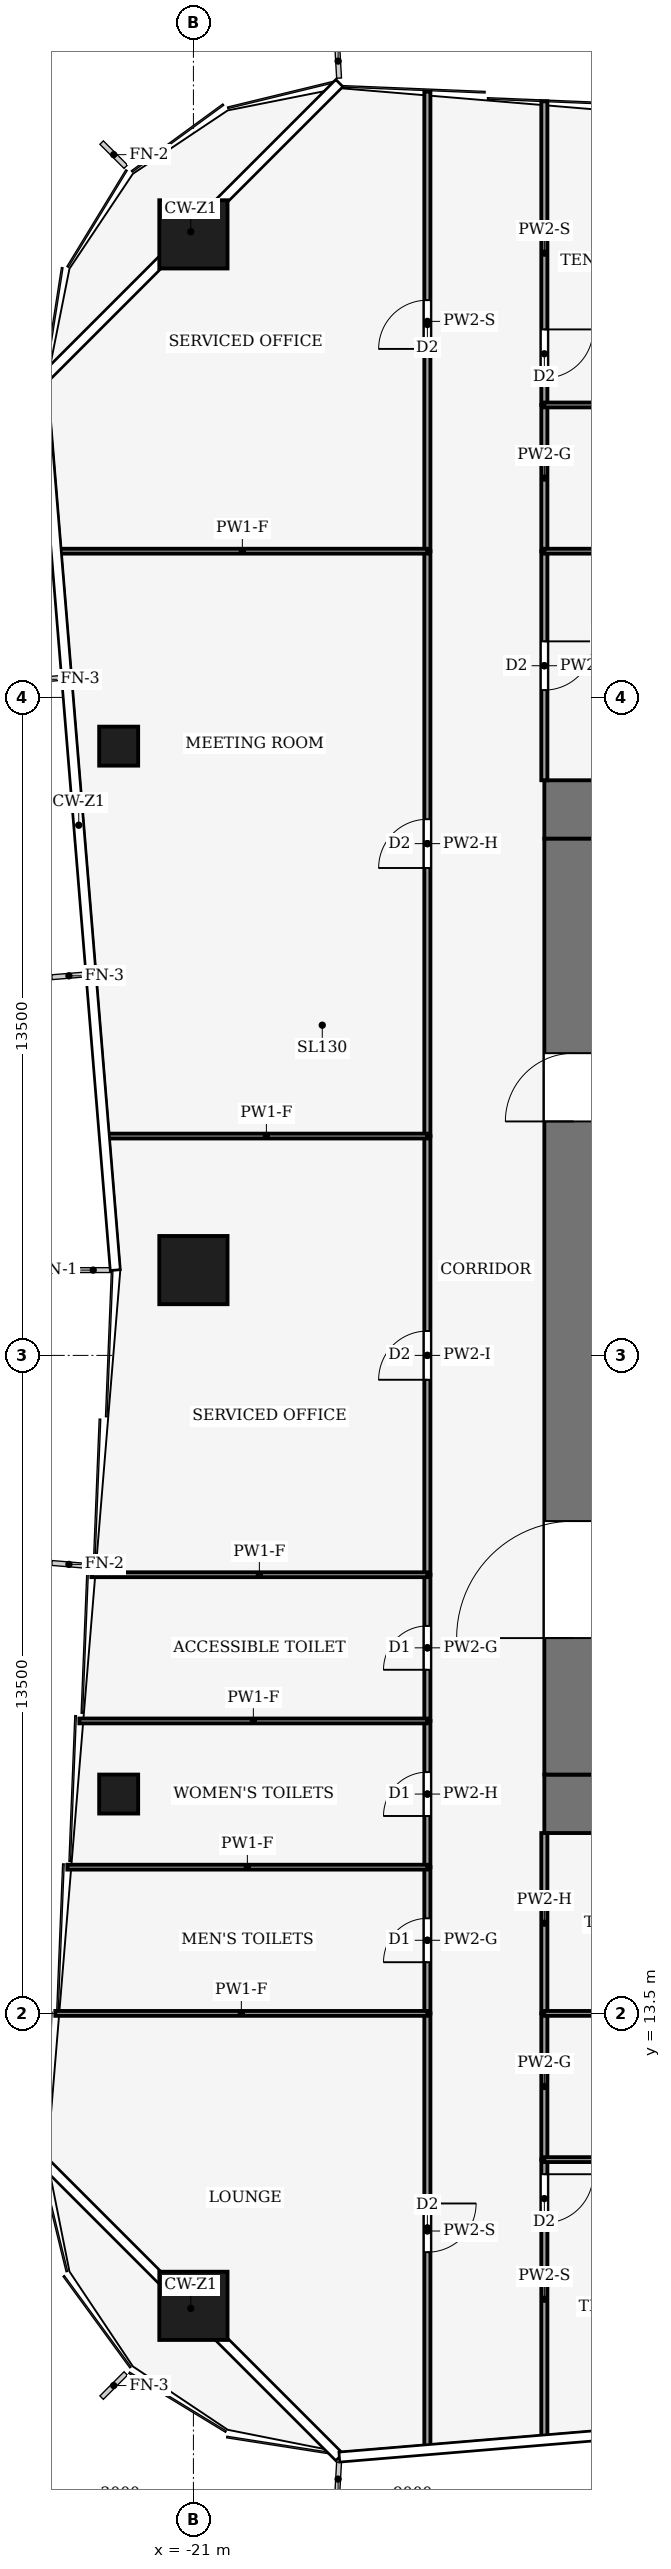
"""IFC4 building model, lengths in metres.
Left out: names, types, materials, properties, quantities, classifications, styles, units other than length and angle.
Written with IfcOpenShell. Run it as: python <this file> out.ifc"""

import sys

from ifc_helpers import new_model, si_unit, direction, frame, frame_2d, origin, origin_2d, place, context, subcontext, project, spatial, rectangle, hollow_rectangle, extrude, element, fill, save


model = new_model("IFC4")
c1 = context("Model", 3, precision=1e-05, world=origin(), true_north=direction((0.0, 1.0)))
c2 = subcontext(c1, "Body", "Model", "MODEL_VIEW")
j1 = project(units=[si_unit("LENGTHUNIT", "METRE"), si_unit("PLANEANGLEUNIT", "RADIAN")], contexts=[c1])
p1 = place(None, origin())
s1 = spatial("IfcSite", under=j1, at=p1, CompositionType="ELEMENT")
p2 = place(p1, origin())
s2 = spatial("IfcBuilding", under=s1, at=p2, CompositionType="ELEMENT")
p3 = place(p2, frame((0.0, 0.0, 94.0)))
s3 = spatial("IfcBuildingStorey", under=s2, at=p3, CompositionType="ELEMENT", Elevation=94.0)
for number, where, z_axis, x_axis in (
    (1, (-13.8, 17.8, -0.13), (0.0, 0.0, 1.0), (1.0, 0.0, 0.0)),
    (2, (-13.8, 38.2, -0.13), (0.0, 0.0, 1.0), (1.0, 0.0, 0.0)),
):
    element("IfcWall", number, at=place(p3, frame(where, z_axis=z_axis, x_axis=x_axis)), inside=s3, PredefinedType="SHEAR", context=c2, shape_type="SweptSolid", body=[
        extrude(rectangle(XDim=27.6, YDim=1.2, at=frame_2d((13.8, 0.0))), origin(), (0.0, 0.0, 1.0), 4.0),
    ])
p4 = place(p3, frame((-13.2, 18.4, -0.13), z_axis=(0.0, 0.0, 1.0), x_axis=(0.0, 1.0, 0.0)))
e3 = element("IfcWall", 3, at=p4, inside=s3, PredefinedType="SHEAR", context=c2, shape_type="SweptSolid", body=[
    extrude(rectangle(XDim=19.2, YDim=1.2, at=frame_2d((9.6, 0.0))), origin(), (0.0, 0.0, 1.0), 4.0),
])
p5 = place(p4, frame((2.8, 0.0, 0.13)))
e4 = element("IfcOpeningElement", 4, at=p5, cuts=e3, PredefinedType="OPENING", context=c2, shape_type="SweptSolid", body=[
    extrude(rectangle(XDim=2.4, YDim=2.4, at=frame_2d((1.2, 1.2))), frame((0.0, 0.61, 0.0), z_axis=(0.0, -1.0, 0.0), x_axis=(1.0, 0.0, 0.0)), (0.0, 0.0, 1.0), 1.22),
])
p6 = place(p4, frame((13.4, 0.0, 0.13)))
e5 = element("IfcOpeningElement", 5, at=p6, cuts=e3, PredefinedType="OPENING", context=c2, shape_type="SweptSolid", body=[
    extrude(rectangle(XDim=1.4, YDim=2.2, at=frame_2d((0.7, 1.1))), frame((0.0, 0.61, 0.0), z_axis=(0.0, -1.0, 0.0), x_axis=(1.0, 0.0, 0.0)), (0.0, 0.0, 1.0), 1.22),
])
for number, where, z_axis, x_axis in (
    (6, (-21.0, 50.0, 0.0), (0.0, 0.0, 1.0), (1.0, 0.0, 0.0)),
    (7, (-21.0, 7.5, 0.0), (0.0, 0.0, 1.0), (1.0, 0.0, 0.0)),
    (8, (-21.0, 28.75, 0.0), (0.0, 0.0, 1.0), (1.0, 0.0, 0.0)),
):
    element("IfcColumn", number, at=place(p3, frame(where, z_axis=z_axis, x_axis=x_axis)), inside=s3, PredefinedType="COLUMN", context=c2, shape_type="SweptSolid", body=[
        extrude(hollow_rectangle(XDim=1.4, YDim=1.4, WallThickness=0.08, at=origin_2d()), origin(), (0.0, 0.0, 1.0), 4.0),
    ])
for number, where, z_axis, x_axis in (
    (9, (-22.534, 18.0, 0.0), (0.0, 0.0, 1.0), (1.0, 0.0, 0.0)),
    (10, (-22.534, 39.5, 0.0), (0.0, 0.0, 1.0), (1.0, 0.0, 0.0)),
):
    element("IfcColumn", number, at=place(p3, frame(where, z_axis=z_axis, x_axis=x_axis)), inside=s3, PredefinedType="COLUMN", context=c2, shape_type="SweptSolid", body=[
        extrude(hollow_rectangle(XDim=0.8, YDim=0.8, WallThickness=0.04, at=origin_2d()), origin(), (0.0, 0.0, 1.0), 4.0),
    ])
p7 = place(p3, frame((-16.2, 13.5, 0.0), z_axis=(0.0, 0.0, 1.0), x_axis=(0.0, -1.0, 0.0)))
e11 = element("IfcWall", 11, at=p7, inside=s3, PredefinedType="PARTITIONING", context=c2, shape_type="SweptSolid", body=[
    extrude(rectangle(XDim=8.93, YDim=0.125, at=frame_2d((4.465, 0.0))), origin(), (0.0, 0.0, 1.0), 3.04),
])
p8 = place(p7, frame((3.9, 0.0, 0.0)))
e12 = element("IfcOpeningElement", 12, at=p8, cuts=e11, PredefinedType="OPENING", context=c2, shape_type="SweptSolid", body=[
    extrude(rectangle(XDim=1.0, YDim=2.1, at=frame_2d((0.5, 1.05))), frame((0.0, 0.073, 0.0), z_axis=(0.0, -1.0, 0.0), x_axis=(1.0, 0.0, 0.0)), (0.0, 0.0, 1.0), 0.145),
])
p9 = place(p3, frame((-16.2, 13.5, 0.0), z_axis=(0.0, 0.0, 1.0), x_axis=(0.0, 1.0, 0.0)))
e13 = element("IfcWall", 13, at=p9, inside=s3, PredefinedType="PARTITIONING", context=c2, shape_type="SweptSolid", body=[
    extrude(rectangle(XDim=3.0, YDim=0.125, at=frame_2d((1.5, 0.0))), origin(), (0.0, 0.0, 1.0), 3.87),
])
p10 = place(p9, frame((1.05, 0.0, 0.0)))
e14 = element("IfcOpeningElement", 14, at=p10, cuts=e13, PredefinedType="OPENING", context=c2, shape_type="SweptSolid", body=[
    extrude(rectangle(XDim=0.9, YDim=2.1, at=frame_2d((0.45, 1.05))), frame((0.0, 0.073, 0.0), z_axis=(0.0, -1.0, 0.0), x_axis=(1.0, 0.0, 0.0)), (0.0, 0.0, 1.0), 0.145),
])
p11 = place(p3, frame((-16.2, 16.5, 0.0), z_axis=(0.0, 0.0, 1.0), x_axis=(0.0, 1.0, 0.0)))
e15 = element("IfcWall", 15, at=p11, inside=s3, PredefinedType="PARTITIONING", context=c2, shape_type="SweptSolid", body=[
    extrude(rectangle(XDim=3.0, YDim=0.125, at=frame_2d((1.5, 0.0))), origin(), (0.0, 0.0, 1.0), 3.14),
])
p12 = place(p11, frame((1.05, 0.0, 0.0)))
e16 = element("IfcOpeningElement", 16, at=p12, cuts=e15, PredefinedType="OPENING", context=c2, shape_type="SweptSolid", body=[
    extrude(rectangle(XDim=0.9, YDim=2.1, at=frame_2d((0.45, 1.05))), frame((0.0, 0.073, 0.0), z_axis=(0.0, -1.0, 0.0), x_axis=(1.0, 0.0, 0.0)), (0.0, 0.0, 1.0), 0.145),
])
p13 = place(p3, frame((-16.2, 19.5, 0.0), z_axis=(0.0, 0.0, 1.0), x_axis=(0.0, 1.0, 0.0)))
e17 = element("IfcWall", 17, at=p13, inside=s3, PredefinedType="PARTITIONING", context=c2, shape_type="SweptSolid", body=[
    extrude(rectangle(XDim=3.0, YDim=0.125, at=frame_2d((1.5, 0.0))), origin(), (0.0, 0.0, 1.0), 3.87),
])
p14 = place(p13, frame((1.05, 0.0, 0.0)))
e18 = element("IfcOpeningElement", 18, at=p14, cuts=e17, PredefinedType="OPENING", context=c2, shape_type="SweptSolid", body=[
    extrude(rectangle(XDim=0.9, YDim=2.1, at=frame_2d((0.45, 1.05))), frame((0.0, 0.073, 0.0), z_axis=(0.0, -1.0, 0.0), x_axis=(1.0, 0.0, 0.0)), (0.0, 0.0, 1.0), 0.145),
])
p15 = place(p3, frame((-16.2, 22.5, 0.0), z_axis=(0.0, 0.0, 1.0), x_axis=(0.0, 1.0, 0.0)))
e19 = element("IfcWall", 19, at=p15, inside=s3, PredefinedType="PARTITIONING", context=c2, shape_type="SweptSolid", body=[
    extrude(rectangle(XDim=9.0, YDim=0.125, at=frame_2d((4.5, 0.0))), origin(), (0.0, 0.0, 1.0), 3.48),
])
p16 = place(p15, frame((4.0, 0.0, 0.0)))
e20 = element("IfcOpeningElement", 20, at=p16, cuts=e19, PredefinedType="OPENING", context=c2, shape_type="SweptSolid", body=[
    extrude(rectangle(XDim=1.0, YDim=2.1, at=frame_2d((0.5, 1.05))), frame((0.0, 0.073, 0.0), z_axis=(0.0, -1.0, 0.0), x_axis=(1.0, 0.0, 0.0)), (0.0, 0.0, 1.0), 0.145),
])
p17 = place(p3, frame((-16.2, 31.5, 0.0), z_axis=(0.0, 0.0, 1.0), x_axis=(0.0, 1.0, 0.0)))
e21 = element("IfcWall", 21, at=p17, inside=s3, PredefinedType="PARTITIONING", context=c2, shape_type="SweptSolid", body=[
    extrude(rectangle(XDim=12.0, YDim=0.125, at=frame_2d((6.0, 0.0))), origin(), (0.0, 0.0, 1.0), 3.14),
])
p18 = place(p17, frame((5.5, 0.0, 0.0)))
e22 = element("IfcOpeningElement", 22, at=p18, cuts=e21, PredefinedType="OPENING", context=c2, shape_type="SweptSolid", body=[
    extrude(rectangle(XDim=1.0, YDim=2.1, at=frame_2d((0.5, 1.05))), frame((0.0, 0.073, 0.0), z_axis=(0.0, -1.0, 0.0), x_axis=(1.0, 0.0, 0.0)), (0.0, 0.0, 1.0), 0.145),
])
p19 = place(p3, frame((-16.2, 43.5, 0.0), z_axis=(0.0, 0.0, 1.0), x_axis=(0.0, 1.0, 0.0)))
e23 = element("IfcWall", 23, at=p19, inside=s3, PredefinedType="PARTITIONING", context=c2, shape_type="SweptSolid", body=[
    extrude(rectangle(XDim=9.43, YDim=0.125, at=frame_2d((4.715, 0.0))), origin(), (0.0, 0.0, 1.0), 3.04),
])
p20 = place(p19, frame((4.15, 0.0, 0.0)))
e24 = element("IfcOpeningElement", 24, at=p20, cuts=e23, PredefinedType="OPENING", context=c2, shape_type="SweptSolid", body=[
    extrude(rectangle(XDim=1.0, YDim=2.1, at=frame_2d((0.5, 1.05))), frame((0.0, 0.073, 0.0), z_axis=(0.0, -1.0, 0.0), x_axis=(1.0, 0.0, 0.0)), (0.0, 0.0, 1.0), 0.145),
])
p21 = place(p3, frame((-13.8, 10.5, 0.0), z_axis=(0.0, 0.0, 1.0), x_axis=(0.0, -1.0, 0.0)))
e25 = element("IfcWall", 25, at=p21, inside=s3, PredefinedType="PARTITIONING", context=c2, shape_type="SweptSolid", body=[
    extrude(rectangle(XDim=5.73, YDim=0.125, at=frame_2d((2.865, 0.0))), origin(), (0.0, 0.0, 1.0), 3.04),
])
p22 = place(p21, frame((0.3, 0.0, 0.0)))
e26 = element("IfcOpeningElement", 26, at=p22, cuts=e25, PredefinedType="OPENING", context=c2, shape_type="SweptSolid", body=[
    extrude(rectangle(XDim=1.0, YDim=2.1, at=frame_2d((0.5, 1.05))), frame((0.0, 0.073, 0.0), z_axis=(0.0, -1.0, 0.0), x_axis=(1.0, 0.0, 0.0)), (0.0, 0.0, 1.0), 0.145),
])
p23 = place(p3, frame((-13.8, 10.5, 0.0), z_axis=(0.0, 0.0, 1.0), x_axis=(0.0, 1.0, 0.0)))
e27 = element("IfcWall", 27, at=p23, inside=s3, PredefinedType="PARTITIONING", context=c2, shape_type="SweptSolid", body=[
    extrude(rectangle(XDim=3.0, YDim=0.125, at=frame_2d((1.5, 0.0))), origin(), (0.0, 0.0, 1.0), 3.87),
])
p24 = place(p3, frame((-13.8, 13.5, 0.0), z_axis=(0.0, 0.0, 1.0), x_axis=(0.0, 1.0, 0.0)))
e28 = element("IfcWall", 28, at=p24, inside=s3, PredefinedType="PARTITIONING", context=c2, shape_type="SweptSolid", body=[
    extrude(rectangle(XDim=3.7, YDim=0.125, at=frame_2d((1.85, 0.0))), origin(), (0.0, 0.0, 1.0), 3.14),
])
p25 = place(p3, frame((-13.8, 43.5, 0.0), z_axis=(0.0, 0.0, 1.0), x_axis=(0.0, -1.0, 0.0)))
e29 = element("IfcWall", 29, at=p25, inside=s3, PredefinedType="PARTITIONING", context=c2, shape_type="SweptSolid", body=[
    extrude(rectangle(XDim=4.7, YDim=0.125, at=frame_2d((2.35, 0.0))), origin(), (0.0, 0.0, 1.0), 3.14),
])
p26 = place(p25, frame((1.85, 0.0, 0.0)))
e30 = element("IfcOpeningElement", 30, at=p26, cuts=e29, PredefinedType="OPENING", context=c2, shape_type="SweptSolid", body=[
    extrude(rectangle(XDim=1.0, YDim=2.1, at=frame_2d((0.5, 1.05))), frame((0.0, 0.073, 0.0), z_axis=(0.0, -1.0, 0.0), x_axis=(1.0, 0.0, 0.0)), (0.0, 0.0, 1.0), 0.145),
])
p27 = place(p3, frame((-13.8, 43.5, 0.0), z_axis=(0.0, 0.0, 1.0), x_axis=(0.0, 1.0, 0.0)))
e31 = element("IfcWall", 31, at=p27, inside=s3, PredefinedType="PARTITIONING", context=c2, shape_type="SweptSolid", body=[
    extrude(rectangle(XDim=3.0, YDim=0.125, at=frame_2d((1.5, 0.0))), origin(), (0.0, 0.0, 1.0), 3.87),
])
p28 = place(p3, frame((-13.8, 52.73, 0.0), z_axis=(0.0, 0.0, 1.0), x_axis=(0.0, -1.0, 0.0)))
e32 = element("IfcWall", 32, at=p28, inside=s3, PredefinedType="PARTITIONING", context=c2, shape_type="SweptSolid", body=[
    extrude(rectangle(XDim=6.23, YDim=0.125, at=frame_2d((3.115, 0.0))), origin(), (0.0, 0.0, 1.0), 3.04),
])
p29 = place(p28, frame((4.68, 0.0, 0.0)))
e33 = element("IfcOpeningElement", 33, at=p29, cuts=e32, PredefinedType="OPENING", context=c2, shape_type="SweptSolid", body=[
    extrude(rectangle(XDim=1.0, YDim=2.1, at=frame_2d((0.5, 1.05))), frame((0.0, 0.073, 0.0), z_axis=(0.0, -1.0, 0.0), x_axis=(1.0, 0.0, 0.0)), (0.0, 0.0, 1.0), 0.145),
])
p30 = place(p3, frame((-16.2, 13.5, 0.0), z_axis=(0.0, 0.0, 1.0), x_axis=(-1.0, 0.0, 0.0)))
e34 = element("IfcWall", 34, at=p30, inside=s3, PredefinedType="PARTITIONING", context=c2, shape_type="SweptSolid", body=[
    extrude(rectangle(XDim=7.634, YDim=0.1, at=frame_2d((3.817, 0.0))), origin(), (0.0, 0.0, 1.0), 3.04),
])
p31 = place(p3, frame((-16.2, 16.5, 0.0), z_axis=(0.0, 0.0, 1.0), x_axis=(-1.0, 0.0, 0.0)))
e35 = element("IfcWall", 35, at=p31, inside=s3, PredefinedType="PARTITIONING", context=c2, shape_type="SweptSolid", body=[
    extrude(rectangle(XDim=7.387, YDim=0.1, at=frame_2d((3.693, 0.0))), origin(), (0.0, 0.0, 1.0), 3.04),
])
p32 = place(p3, frame((-16.2, 19.5, 0.0), z_axis=(0.0, 0.0, 1.0), x_axis=(-1.0, 0.0, 0.0)))
e36 = element("IfcWall", 36, at=p32, inside=s3, PredefinedType="PARTITIONING", context=c2, shape_type="SweptSolid", body=[
    extrude(rectangle(XDim=7.14, YDim=0.1, at=frame_2d((3.57, 0.0))), origin(), (0.0, 0.0, 1.0), 3.04),
])
p33 = place(p3, frame((-16.2, 22.5, 0.0), z_axis=(0.0, 0.0, 1.0), x_axis=(-1.0, 0.0, 0.0)))
e37 = element("IfcWall", 37, at=p33, inside=s3, PredefinedType="PARTITIONING", context=c2, shape_type="SweptSolid", body=[
    extrude(rectangle(XDim=6.894, YDim=0.1, at=frame_2d((3.447, 0.0))), origin(), (0.0, 0.0, 1.0), 3.04),
])
p34 = place(p3, frame((-16.2, 31.5, 0.0), z_axis=(0.0, 0.0, 1.0), x_axis=(-1.0, 0.0, 0.0)))
e38 = element("IfcWall", 38, at=p34, inside=s3, PredefinedType="PARTITIONING", context=c2, shape_type="SweptSolid", body=[
    extrude(rectangle(XDim=6.606, YDim=0.1, at=frame_2d((3.303, 0.0))), origin(), (0.0, 0.0, 1.0), 3.04),
])
p35 = place(p3, frame((-16.2, 43.5, 0.0), z_axis=(0.0, 0.0, 1.0), x_axis=(-1.0, 0.0, 0.0)))
e39 = element("IfcWall", 39, at=p35, inside=s3, PredefinedType="PARTITIONING", context=c2, shape_type="SweptSolid", body=[
    extrude(rectangle(XDim=7.592, YDim=0.1, at=frame_2d((3.796, 0.0))), origin(), (0.0, 0.0, 1.0), 3.04),
])
p36 = place(p3, frame((-13.8, 10.5, 0.0), z_axis=(0.0, 0.0, 1.0), x_axis=(1.0, 0.0, 0.0)))
e40 = element("IfcWall", 40, at=p36, inside=s3, PredefinedType="PARTITIONING", context=c2, shape_type="SweptSolid", body=[
    extrude(rectangle(XDim=6.3, YDim=0.1, at=frame_2d((3.15, 0.0))), origin(), (0.0, 0.0, 1.0), 3.39),
])
p37 = place(p36, frame((2.65, 0.0, 0.0)))
e41 = element("IfcOpeningElement", 41, at=p37, cuts=e40, PredefinedType="OPENING", context=c2, shape_type="SweptSolid", body=[
    extrude(rectangle(XDim=1.0, YDim=2.1, at=frame_2d((0.5, 1.05))), frame((0.0, 0.06, 0.0), z_axis=(0.0, -1.0, 0.0), x_axis=(1.0, 0.0, 0.0)), (0.0, 0.0, 1.0), 0.12),
])
p38 = place(p3, frame((-13.8, 13.5, 0.0), z_axis=(0.0, 0.0, 1.0), x_axis=(1.0, 0.0, 0.0)))
e42 = element("IfcWall", 42, at=p38, inside=s3, PredefinedType="PARTITIONING", context=c2, shape_type="SweptSolid", body=[
    extrude(rectangle(XDim=6.3, YDim=0.1, at=frame_2d((3.15, 0.0))), origin(), (0.0, 0.0, 1.0), 3.39),
])
p39 = place(p38, frame((2.65, 0.0, 0.0)))
e43 = element("IfcOpeningElement", 43, at=p39, cuts=e42, PredefinedType="OPENING", context=c2, shape_type="SweptSolid", body=[
    extrude(rectangle(XDim=1.0, YDim=2.1, at=frame_2d((0.5, 1.05))), frame((0.0, 0.06, 0.0), z_axis=(0.0, -1.0, 0.0), x_axis=(1.0, 0.0, 0.0)), (0.0, 0.0, 1.0), 0.12),
])
p40 = place(p3, frame((-13.8, 43.5, 0.0), z_axis=(0.0, 0.0, 1.0), x_axis=(1.0, 0.0, 0.0)))
e44 = element("IfcWall", 44, at=p40, inside=s3, PredefinedType="PARTITIONING", context=c2, shape_type="SweptSolid", body=[
    extrude(rectangle(XDim=6.3, YDim=0.1, at=frame_2d((3.15, 0.0))), origin(), (0.0, 0.0, 1.0), 3.39),
])
p41 = place(p40, frame((2.65, 0.0, 0.0)))
e45 = element("IfcOpeningElement", 45, at=p41, cuts=e44, PredefinedType="OPENING", context=c2, shape_type="SweptSolid", body=[
    extrude(rectangle(XDim=1.0, YDim=2.1, at=frame_2d((0.5, 1.05))), frame((0.0, 0.06, 0.0), z_axis=(0.0, -1.0, 0.0), x_axis=(1.0, 0.0, 0.0)), (0.0, 0.0, 1.0), 0.12),
])
p42 = place(p3, frame((-7.5, 46.5, 0.0), z_axis=(0.0, 0.0, 1.0), x_axis=(-1.0, 0.0, 0.0)))
e46 = element("IfcWall", 46, at=p42, inside=s3, PredefinedType="PARTITIONING", context=c2, shape_type="SweptSolid", body=[
    extrude(rectangle(XDim=6.3, YDim=0.1, at=frame_2d((3.15, 0.0))), origin(), (0.0, 0.0, 1.0), 3.39),
])
p43 = place(p5, origin())
e47 = element("IfcDoor", 47, at=p43, inside=s3, OperationType="DOUBLE_DOOR_SINGLE_SWING", PredefinedType="DOOR", context=c2, shape_type="SweptSolid", body=[
    extrude(rectangle(XDim=2.4, YDim=2.4, at=frame_2d((1.2, 1.2))), frame((0.0, 0.025, 0.0), z_axis=(0.0, -1.0, 0.0), x_axis=(1.0, 0.0, 0.0)), (0.0, 0.0, 1.0), 0.05),
])
fill(e4, e47)
p44 = place(p6, origin())
e48 = element("IfcDoor", 48, at=p44, inside=s3, OperationType="SINGLE_SWING_RIGHT", PredefinedType="DOOR", context=c2, shape_type="SweptSolid", body=[
    extrude(rectangle(XDim=1.4, YDim=2.2, at=frame_2d((0.7, 1.1))), frame((0.0, 0.025, 0.0), z_axis=(0.0, -1.0, 0.0), x_axis=(1.0, 0.0, 0.0)), (0.0, 0.0, 1.0), 0.05),
])
fill(e5, e48)
p45 = place(p8, origin())
e49 = element("IfcDoor", 49, at=p45, inside=s3, OperationType="SINGLE_SWING_LEFT", PredefinedType="DOOR", context=c2, shape_type="SweptSolid", body=[
    extrude(rectangle(XDim=1.0, YDim=2.1, at=frame_2d((0.5, 1.05))), frame((0.0, 0.025, 0.0), z_axis=(0.0, -1.0, 0.0), x_axis=(1.0, 0.0, 0.0)), (0.0, 0.0, 1.0), 0.05),
])
fill(e12, e49)
p46 = place(p10, origin())
e50 = element("IfcDoor", 50, at=p46, inside=s3, OperationType="SINGLE_SWING_RIGHT", PredefinedType="DOOR", context=c2, shape_type="SweptSolid", body=[
    extrude(rectangle(XDim=0.9, YDim=2.1, at=frame_2d((0.45, 1.05))), frame((0.0, 0.025, 0.0), z_axis=(0.0, -1.0, 0.0), x_axis=(1.0, 0.0, 0.0)), (0.0, 0.0, 1.0), 0.05),
])
fill(e14, e50)
p47 = place(p12, origin())
e51 = element("IfcDoor", 51, at=p47, inside=s3, OperationType="SINGLE_SWING_LEFT", PredefinedType="DOOR", context=c2, shape_type="SweptSolid", body=[
    extrude(rectangle(XDim=0.9, YDim=2.1, at=frame_2d((0.45, 1.05))), frame((0.0, 0.025, 0.0), z_axis=(0.0, -1.0, 0.0), x_axis=(1.0, 0.0, 0.0)), (0.0, 0.0, 1.0), 0.05),
])
fill(e16, e51)
p48 = place(p14, origin())
e52 = element("IfcDoor", 52, at=p48, inside=s3, OperationType="SINGLE_SWING_RIGHT", PredefinedType="DOOR", context=c2, shape_type="SweptSolid", body=[
    extrude(rectangle(XDim=0.9, YDim=2.1, at=frame_2d((0.45, 1.05))), frame((0.0, 0.025, 0.0), z_axis=(0.0, -1.0, 0.0), x_axis=(1.0, 0.0, 0.0)), (0.0, 0.0, 1.0), 0.05),
])
fill(e18, e52)
p49 = place(p16, origin())
e53 = element("IfcDoor", 53, at=p49, inside=s3, OperationType="SINGLE_SWING_LEFT", PredefinedType="DOOR", context=c2, shape_type="SweptSolid", body=[
    extrude(rectangle(XDim=1.0, YDim=2.1, at=frame_2d((0.5, 1.05))), frame((0.0, 0.025, 0.0), z_axis=(0.0, -1.0, 0.0), x_axis=(1.0, 0.0, 0.0)), (0.0, 0.0, 1.0), 0.05),
])
fill(e20, e53)
p50 = place(p18, origin())
e54 = element("IfcDoor", 54, at=p50, inside=s3, OperationType="SINGLE_SWING_RIGHT", PredefinedType="DOOR", context=c2, shape_type="SweptSolid", body=[
    extrude(rectangle(XDim=1.0, YDim=2.1, at=frame_2d((0.5, 1.05))), frame((0.0, 0.025, 0.0), z_axis=(0.0, -1.0, 0.0), x_axis=(1.0, 0.0, 0.0)), (0.0, 0.0, 1.0), 0.05),
])
fill(e22, e54)
p51 = place(p20, origin())
e55 = element("IfcDoor", 55, at=p51, inside=s3, OperationType="SINGLE_SWING_LEFT", PredefinedType="DOOR", context=c2, shape_type="SweptSolid", body=[
    extrude(rectangle(XDim=1.0, YDim=2.1, at=frame_2d((0.5, 1.05))), frame((0.0, 0.025, 0.0), z_axis=(0.0, -1.0, 0.0), x_axis=(1.0, 0.0, 0.0)), (0.0, 0.0, 1.0), 0.05),
])
fill(e24, e55)
p52 = place(p22, origin())
e56 = element("IfcDoor", 56, at=p52, inside=s3, OperationType="SINGLE_SWING_LEFT", PredefinedType="DOOR", context=c2, shape_type="SweptSolid", body=[
    extrude(rectangle(XDim=1.0, YDim=2.1, at=frame_2d((0.5, 1.05))), frame((0.0, 0.025, 0.0), z_axis=(0.0, -1.0, 0.0), x_axis=(1.0, 0.0, 0.0)), (0.0, 0.0, 1.0), 0.05),
])
fill(e26, e56)
p53 = place(p26, origin())
e57 = element("IfcDoor", 57, at=p53, inside=s3, OperationType="SINGLE_SWING_LEFT", PredefinedType="DOOR", context=c2, shape_type="SweptSolid", body=[
    extrude(rectangle(XDim=1.0, YDim=2.1, at=frame_2d((0.5, 1.05))), frame((0.0, 0.025, 0.0), z_axis=(0.0, -1.0, 0.0), x_axis=(1.0, 0.0, 0.0)), (0.0, 0.0, 1.0), 0.05),
])
fill(e30, e57)
p54 = place(p29, origin())
e58 = element("IfcDoor", 58, at=p54, inside=s3, OperationType="SINGLE_SWING_RIGHT", PredefinedType="DOOR", context=c2, shape_type="SweptSolid", body=[
    extrude(rectangle(XDim=1.0, YDim=2.1, at=frame_2d((0.5, 1.05))), frame((0.0, 0.025, 0.0), z_axis=(0.0, -1.0, 0.0), x_axis=(1.0, 0.0, 0.0)), (0.0, 0.0, 1.0), 0.05),
])
fill(e33, e58)
save(model, sys.argv[1])
